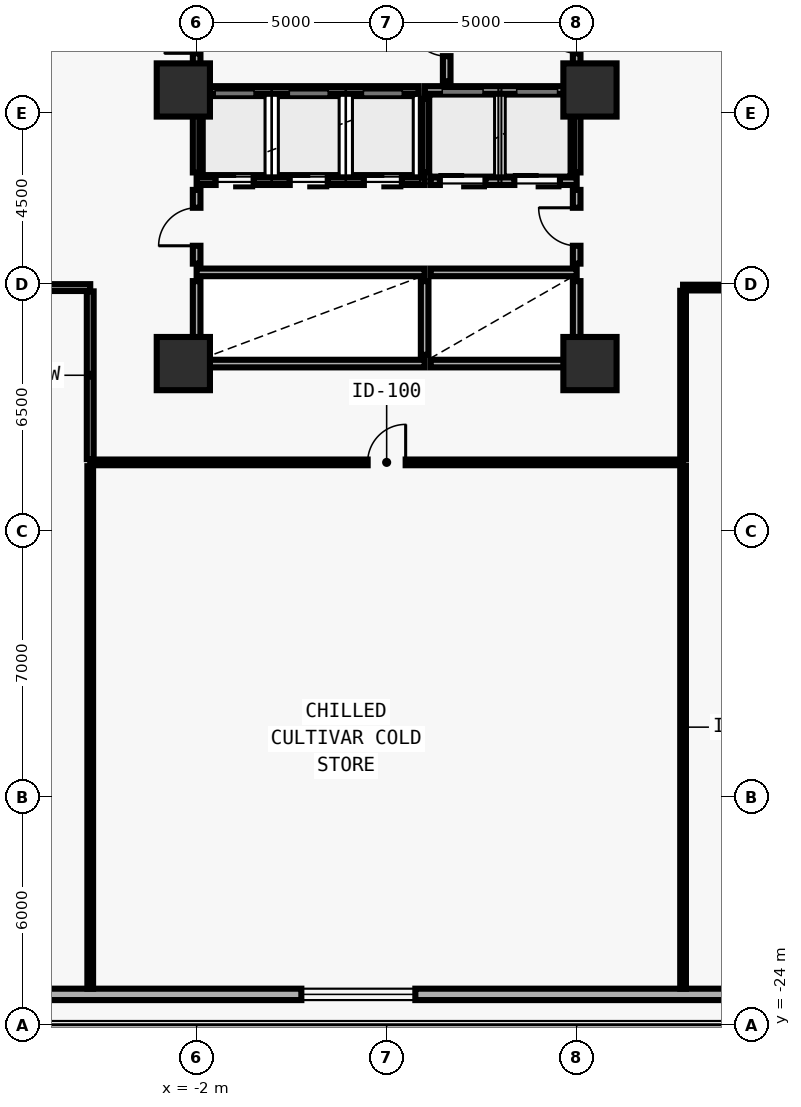
"""IFC4 building model, lengths in metres.
Left out: names, types, materials, properties, quantities, classifications, styles, units other than length and angle.
Written with IfcOpenShell. Run it as: python <this file> out.ifc"""

import sys

from ifc_helpers import new_model, si_unit, direction, frame, frame_2d, origin, origin_2d, place, context, subcontext, project, spatial, rectangle, extrude, element, fill, save


model = new_model("IFC4")
c1 = context("Model", 3, precision=1e-05, world=origin(), true_north=direction((0.0, 1.0)))
c2 = subcontext(c1, "Body", "Model", "MODEL_VIEW")
j1 = project(units=[si_unit("LENGTHUNIT", "METRE"), si_unit("PLANEANGLEUNIT", "RADIAN")], contexts=[c1])
p1 = place(None, origin())
s1 = spatial("IfcSite", under=j1, at=p1, CompositionType="ELEMENT")
p2 = place(p1, origin())
s2 = spatial("IfcBuilding", under=s1, at=p2, CompositionType="ELEMENT")
p3 = place(p2, frame((0.0, 0.0, 4.6)))
s3 = spatial("IfcBuildingStorey", under=s2, at=p3, CompositionType="ELEMENT", Elevation=4.6)
for number, where, z_axis, x_axis in (
    (1, (-2.35, 0.6, 0.0), (0.0, 0.0, 1.0), (1.0, 0.0, 0.0)),
    (2, (8.35, 0.6, 0.0), (0.0, 0.0, 1.0), (1.0, 0.0, 0.0)),
    (3, (-2.35, -6.6, 0.0), (0.0, 0.0, 1.0), (1.0, 0.0, 0.0)),
    (4, (8.35, -6.6, 0.0), (0.0, 0.0, 1.0), (1.0, 0.0, 0.0)),
):
    element("IfcColumn", number, at=place(p3, frame(where, z_axis=z_axis, x_axis=x_axis)), inside=s3, PredefinedType="COLUMN", context=c2, shape_type="SweptSolid", body=[
        extrude(rectangle(XDim=1.4, YDim=1.4, at=origin_2d()), origin(), (0.0, 0.0, 1.0), 4.575),
    ])
p4 = place(p3, frame((32.755, -23.2, 0.0), z_axis=(0.0, 0.0, 1.0), x_axis=(-1.0, 0.0, 0.0)))
e5 = element("IfcWall", 5, at=p4, inside=s3, PredefinedType="SOLIDWALL", context=c2, shape_type="SweptSolid", body=[
    extrude(rectangle(XDim=65.51, YDim=0.3, at=frame_2d((32.755, 0.0))), origin(), (0.0, 0.0, 1.0), 3.35),
])
p5 = place(p4, frame((29.0, 0.0, 0.85)))
e6 = element("IfcOpeningElement", 6, at=p5, cuts=e5, PredefinedType="OPENING", context=c2, shape_type="SweptSolid", body=[
    extrude(rectangle(XDim=3.0, YDim=2.1, at=frame_2d((1.5, 1.05))), frame((0.0, 0.16, 0.0), z_axis=(0.0, -1.0, 0.0), x_axis=(1.0, 0.0, 0.0)), (0.0, 0.0, 1.0), 0.32),
])
p6 = place(p3, frame((4.0, 0.6, 0.0), z_axis=(0.0, 0.0, 1.0), x_axis=(1.0, 0.0, 0.0)))
e7 = element("IfcWall", 7, at=p6, inside=s3, PredefinedType="SOLIDWALL", context=c2, shape_type="SweptSolid", body=[
    extrude(rectangle(XDim=3.88, YDim=0.2, at=frame_2d((1.94, 0.0))), origin(), (0.0, 0.0, 1.0), 3.362),
])
p7 = place(p3, frame((-2.0, -1.8, 0.0), z_axis=(0.0, 0.0, 1.0), x_axis=(1.0, 0.0, 0.0)))
e8 = element("IfcWall", 8, at=p7, inside=s3, PredefinedType="SOLIDWALL", context=c2, shape_type="SweptSolid", body=[
    extrude(rectangle(XDim=6.0, YDim=0.2, at=frame_2d((3.0, 0.0))), origin(), (0.0, 0.0, 1.0), 4.28),
])
p8 = place(p7, frame((0.5, 0.0, 0.0)))
e9 = element("IfcOpeningElement", 9, at=p8, cuts=e8, PredefinedType="OPENING", context=c2, shape_type="SweptSolid", body=[
    extrude(rectangle(XDim=1.0, YDim=2.2, at=frame_2d((0.5, 1.1))), frame((0.0, 0.11, 0.0), z_axis=(0.0, -1.0, 0.0), x_axis=(1.0, 0.0, 0.0)), (0.0, 0.0, 1.0), 0.22),
])
p9 = place(p7, frame((2.45, 0.0, 0.0)))
e10 = element("IfcOpeningElement", 10, at=p9, cuts=e8, PredefinedType="OPENING", context=c2, shape_type="SweptSolid", body=[
    extrude(rectangle(XDim=1.0, YDim=2.2, at=frame_2d((0.5, 1.1))), frame((0.0, 0.11, 0.0), z_axis=(0.0, -1.0, 0.0), x_axis=(1.0, 0.0, 0.0)), (0.0, 0.0, 1.0), 0.22),
])
p10 = place(p7, frame((4.4, 0.0, 0.0)))
e11 = element("IfcOpeningElement", 11, at=p10, cuts=e8, PredefinedType="OPENING", context=c2, shape_type="SweptSolid", body=[
    extrude(rectangle(XDim=1.0, YDim=2.2, at=frame_2d((0.5, 1.1))), frame((0.0, 0.11, 0.0), z_axis=(0.0, -1.0, 0.0), x_axis=(1.0, 0.0, 0.0)), (0.0, 0.0, 1.0), 0.22),
])
p11 = place(p3, frame((-2.0, -1.57, 0.0), z_axis=(0.0, 0.0, 1.0), x_axis=(0.0, 1.0, 0.0)))
e12 = element("IfcWall", 12, at=p11, inside=s3, PredefinedType="SOLIDWALL", context=c2, shape_type="SweptSolid", body=[
    extrude(rectangle(XDim=2.05, YDim=0.2, at=frame_2d((1.025, 0.0))), origin(), (0.0, 0.0, 1.0), 3.362),
])
p12 = place(p3, frame((4.16, -1.8, 0.0), z_axis=(0.0, 0.0, 1.0), x_axis=(1.0, 0.0, 0.0)))
e13 = element("IfcWall", 13, at=p12, inside=s3, PredefinedType="SOLIDWALL", context=c2, shape_type="SweptSolid", body=[
    extrude(rectangle(XDim=3.84, YDim=0.2, at=frame_2d((1.92, 0.0))), origin(), (0.0, 0.0, 1.0), 4.28),
])
p13 = place(p12, frame((0.24, 0.0, 0.0)))
e14 = element("IfcOpeningElement", 14, at=p13, cuts=e13, PredefinedType="OPENING", context=c2, shape_type="SweptSolid", body=[
    extrude(rectangle(XDim=1.2, YDim=2.25, at=frame_2d((0.6, 1.125))), frame((0.0, 0.11, 0.0), z_axis=(0.0, -1.0, 0.0), x_axis=(1.0, 0.0, 0.0)), (0.0, 0.0, 1.0), 0.22),
])
p14 = place(p12, frame((2.2, 0.0, 0.0)))
e15 = element("IfcOpeningElement", 15, at=p14, cuts=e13, PredefinedType="OPENING", context=c2, shape_type="SweptSolid", body=[
    extrude(rectangle(XDim=1.2, YDim=2.25, at=frame_2d((0.6, 1.125))), frame((0.0, 0.11, 0.0), z_axis=(0.0, -1.0, 0.0), x_axis=(1.0, 0.0, 0.0)), (0.0, 0.0, 1.0), 0.22),
])
p15 = place(p3, frame((4.0, -1.57, 0.0), z_axis=(0.0, 0.0, 1.0), x_axis=(0.0, 1.0, 0.0)))
e16 = element("IfcWall", 16, at=p15, inside=s3, PredefinedType="SOLIDWALL", context=c2, shape_type="SweptSolid", body=[
    extrude(rectangle(XDim=1.94, YDim=0.2, at=frame_2d((0.97, 0.0))), origin(), (0.0, 0.0, 1.0), 4.28),
])
p16 = place(p3, frame((8.0, -1.57, 0.0), z_axis=(0.0, 0.0, 1.0), x_axis=(0.0, 1.0, 0.0)))
e17 = element("IfcWall", 17, at=p16, inside=s3, PredefinedType="SOLIDWALL", context=c2, shape_type="SweptSolid", body=[
    extrude(rectangle(XDim=2.05, YDim=0.2, at=frame_2d((1.025, 0.0))), origin(), (0.0, 0.0, 1.0), 3.362),
])
p17 = place(p3, frame((-2.0, -4.2, 0.0), z_axis=(0.0, 0.0, 1.0), x_axis=(1.0, 0.0, 0.0)))
e18 = element("IfcWall", 18, at=p17, inside=s3, PredefinedType="SOLIDWALL", context=c2, shape_type="SweptSolid", body=[
    extrude(rectangle(XDim=6.0, YDim=0.2, at=frame_2d((3.0, 0.0))), origin(), (0.0, 0.0, 1.0), 4.28),
])
p18 = place(p3, frame((-2.0, -6.6, 0.0), z_axis=(0.0, 0.0, 1.0), x_axis=(1.0, 0.0, 0.0)))
e19 = element("IfcWall", 19, at=p18, inside=s3, PredefinedType="SOLIDWALL", context=c2, shape_type="SweptSolid", body=[
    extrude(rectangle(XDim=6.0, YDim=0.2, at=frame_2d((3.0, 0.0))), origin(), (0.0, 0.0, 1.0), 3.362),
])
p19 = place(p3, frame((-2.0, -6.37, 0.0), z_axis=(0.0, 0.0, 1.0), x_axis=(0.0, 1.0, 0.0)))
e20 = element("IfcWall", 20, at=p19, inside=s3, PredefinedType="SOLIDWALL", context=c2, shape_type="SweptSolid", body=[
    extrude(rectangle(XDim=1.94, YDim=0.2, at=frame_2d((0.97, 0.0))), origin(), (0.0, 0.0, 1.0), 3.362),
])
p20 = place(p3, frame((4.16, -4.2, 0.0), z_axis=(0.0, 0.0, 1.0), x_axis=(1.0, 0.0, 0.0)))
e21 = element("IfcWall", 21, at=p20, inside=s3, PredefinedType="SOLIDWALL", context=c2, shape_type="SweptSolid", body=[
    extrude(rectangle(XDim=3.84, YDim=0.2, at=frame_2d((1.92, 0.0))), origin(), (0.0, 0.0, 1.0), 4.28),
])
p21 = place(p3, frame((4.16, -6.6, 0.0), z_axis=(0.0, 0.0, 1.0), x_axis=(1.0, 0.0, 0.0)))
e22 = element("IfcWall", 22, at=p21, inside=s3, PredefinedType="SOLIDWALL", context=c2, shape_type="SweptSolid", body=[
    extrude(rectangle(XDim=3.84, YDim=0.2, at=frame_2d((1.92, 0.0))), origin(), (0.0, 0.0, 1.0), 3.362),
])
p22 = place(p3, frame((4.0, -6.37, 0.0), z_axis=(0.0, 0.0, 1.0), x_axis=(0.0, 1.0, 0.0)))
e23 = element("IfcWall", 23, at=p22, inside=s3, PredefinedType="SOLIDWALL", context=c2, shape_type="SweptSolid", body=[
    extrude(rectangle(XDim=1.94, YDim=0.2, at=frame_2d((0.97, 0.0))), origin(), (0.0, 0.0, 1.0), 4.28),
])
p23 = place(p3, frame((8.0, -6.37, 0.0), z_axis=(0.0, 0.0, 1.0), x_axis=(0.0, 1.0, 0.0)))
e24 = element("IfcWall", 24, at=p23, inside=s3, PredefinedType="SOLIDWALL", context=c2, shape_type="SweptSolid", body=[
    extrude(rectangle(XDim=1.94, YDim=0.2, at=frame_2d((0.97, 0.0))), origin(), (0.0, 0.0, 1.0), 3.362),
])
p24 = place(p3, frame((4.58, 0.83, 0.0), z_axis=(0.0, 0.0, 1.0), x_axis=(0.0, 1.0, 0.0)))
e25 = element("IfcWall", 25, at=p24, inside=s3, PredefinedType="MOVABLE", context=c2, shape_type="SweptSolid", body=[
    extrude(rectangle(XDim=2.14, YDim=0.2, at=frame_2d((1.07, 0.0))), origin(), (0.0, 0.0, 1.0), 4.28),
])
p25 = place(p24, frame((0.66, 0.0, 0.0)))
e26 = element("IfcOpeningElement", 26, at=p25, cuts=e25, PredefinedType="OPENING", context=c2, shape_type="SweptSolid", body=[
    extrude(rectangle(XDim=1.0, YDim=2.1, at=frame_2d((0.5, 1.05))), frame((0.0, 0.11, 0.0), z_axis=(0.0, -1.0, 0.0), x_axis=(1.0, 0.0, 0.0)), (0.0, 0.0, 1.0), 0.22),
])
p26 = place(p3, frame((-2.0, 0.72, 0.0), z_axis=(0.0, 0.0, 1.0), x_axis=(0.0, 1.0, 0.0)))
e27 = element("IfcWall", 27, at=p26, inside=s3, PredefinedType="MOVABLE", context=c2, shape_type="SweptSolid", body=[
    extrude(rectangle(XDim=2.25, YDim=0.2, at=frame_2d((1.125, 0.0))), origin(), (0.0, 0.0, 1.0), 3.512),
])
p27 = place(p26, frame((0.845, 0.0, 0.0)))
e28 = element("IfcOpeningElement", 28, at=p27, cuts=e27, PredefinedType="OPENING", context=c2, shape_type="SweptSolid", body=[
    extrude(rectangle(XDim=0.85, YDim=2.1, at=frame_2d((0.425, 1.05))), frame((0.0, 0.11, 0.0), z_axis=(0.0, -1.0, 0.0), x_axis=(1.0, 0.0, 0.0)), (0.0, 0.0, 1.0), 0.22),
])
p28 = place(p3, frame((8.0, 0.72, 0.0), z_axis=(0.0, 0.0, 1.0), x_axis=(0.0, 1.0, 0.0)))
e29 = element("IfcWall", 29, at=p28, inside=s3, PredefinedType="MOVABLE", context=c2, shape_type="SweptSolid", body=[
    extrude(rectangle(XDim=2.25, YDim=0.2, at=frame_2d((1.125, 0.0))), origin(), (0.0, 0.0, 1.0), 3.512),
])
p29 = place(p28, frame((0.845, 0.0, 0.0)))
e30 = element("IfcOpeningElement", 30, at=p29, cuts=e29, PredefinedType="OPENING", context=c2, shape_type="SweptSolid", body=[
    extrude(rectangle(XDim=0.85, YDim=2.1, at=frame_2d((0.425, 1.05))), frame((0.0, 0.11, 0.0), z_axis=(0.0, -1.0, 0.0), x_axis=(1.0, 0.0, 0.0)), (0.0, 0.0, 1.0), 0.22),
])
p30 = place(p3, frame((-2.0, -3.97, 0.0), z_axis=(0.0, 0.0, 1.0), x_axis=(0.0, 1.0, 0.0)))
e31 = element("IfcWall", 31, at=p30, inside=s3, PredefinedType="MOVABLE", context=c2, shape_type="SweptSolid", body=[
    extrude(rectangle(XDim=1.94, YDim=0.2, at=frame_2d((0.97, 0.0))), origin(), (0.0, 0.0, 1.0), 3.362),
])
p31 = place(p30, frame((0.47, 0.0, 0.0)))
e32 = element("IfcOpeningElement", 32, at=p31, cuts=e31, PredefinedType="OPENING", context=c2, shape_type="SweptSolid", body=[
    extrude(rectangle(XDim=1.0, YDim=2.1, at=frame_2d((0.5, 1.05))), frame((0.0, 0.11, 0.0), z_axis=(0.0, -1.0, 0.0), x_axis=(1.0, 0.0, 0.0)), (0.0, 0.0, 1.0), 0.22),
])
p32 = place(p3, frame((8.0, -3.97, 0.0), z_axis=(0.0, 0.0, 1.0), x_axis=(0.0, 1.0, 0.0)))
e33 = element("IfcWall", 33, at=p32, inside=s3, PredefinedType="MOVABLE", context=c2, shape_type="SweptSolid", body=[
    extrude(rectangle(XDim=1.94, YDim=0.2, at=frame_2d((0.97, 0.0))), origin(), (0.0, 0.0, 1.0), 3.362),
])
p33 = place(p32, frame((0.47, 0.0, 0.0)))
e34 = element("IfcOpeningElement", 34, at=p33, cuts=e33, PredefinedType="OPENING", context=c2, shape_type="SweptSolid", body=[
    extrude(rectangle(XDim=1.0, YDim=2.1, at=frame_2d((0.5, 1.05))), frame((0.0, 0.11, 0.0), z_axis=(0.0, -1.0, 0.0), x_axis=(1.0, 0.0, 0.0)), (0.0, 0.0, 1.0), 0.22),
])
p34 = place(p3, frame((-33.05, -4.6, 0.0), z_axis=(0.0, 0.0, 1.0), x_axis=(1.0, 0.0, 0.0)))
e35 = element("IfcWall", 35, at=p34, inside=s3, PredefinedType="PLUMBINGWALL", context=c2, shape_type="SweptSolid", body=[
    extrude(rectangle(XDim=28.25, YDim=0.18, at=frame_2d((14.125, 0.0))), origin(), (0.0, 0.0, 1.0), 4.28),
])
p35 = place(p34, frame((13.625, 0.0, 0.0)))
e36 = element("IfcOpeningElement", 36, at=p35, cuts=e35, PredefinedType="OPENING", context=c2, shape_type="SweptSolid", body=[
    extrude(rectangle(XDim=1.0, YDim=2.1, at=frame_2d((0.5, 1.05))), frame((0.0, 0.1, 0.0), z_axis=(0.0, -1.0, 0.0), x_axis=(1.0, 0.0, 0.0)), (0.0, 0.0, 1.0), 0.2),
])
p36 = place(p3, frame((10.8, -4.6, 0.0), z_axis=(0.0, 0.0, 1.0), x_axis=(1.0, 0.0, 0.0)))
e37 = element("IfcWall", 37, at=p36, inside=s3, PredefinedType="PARTITIONING", context=c2, shape_type="SweptSolid", body=[
    extrude(rectangle(XDim=16.4, YDim=0.15, at=frame_2d((8.2, 0.0))), origin(), (0.0, 0.0, 1.0), 4.28),
])
p37 = place(p36, frame((7.7, 0.0, 0.0)))
e38 = element("IfcOpeningElement", 38, at=p37, cuts=e37, PredefinedType="OPENING", context=c2, shape_type="SweptSolid", body=[
    extrude(rectangle(XDim=1.0, YDim=2.1, at=frame_2d((0.5, 1.05))), frame((0.0, 0.085, 0.0), z_axis=(0.0, -1.0, 0.0), x_axis=(1.0, 0.0, 0.0)), (0.0, 0.0, 1.0), 0.17),
])
p38 = place(p3, frame((-4.8, -9.2, 0.0), z_axis=(0.0, 0.0, 1.0), x_axis=(1.0, 0.0, 0.0)))
e39 = element("IfcWall", 39, at=p38, inside=s3, PredefinedType="PARTITIONING", context=c2, shape_type="SweptSolid", body=[
    extrude(rectangle(XDim=15.6, YDim=0.15, at=frame_2d((7.8, 0.0))), origin(), (0.0, 0.0, 1.0), 4.28),
])
p39 = place(p38, frame((7.3, 0.0, 0.0)))
e40 = element("IfcOpeningElement", 40, at=p39, cuts=e39, PredefinedType="OPENING", context=c2, shape_type="SweptSolid", body=[
    extrude(rectangle(XDim=1.0, YDim=2.1, at=frame_2d((0.5, 1.05))), frame((0.0, 0.085, 0.0), z_axis=(0.0, -1.0, 0.0), x_axis=(1.0, 0.0, 0.0)), (0.0, 0.0, 1.0), 0.17),
])
p40 = place(p3, frame((-1.88, 0.6, 0.0), z_axis=(0.0, 0.0, 1.0), x_axis=(1.0, 0.0, 0.0)))
e41 = element("IfcWall", 41, at=p40, inside=s3, PredefinedType="MOVABLE", context=c2, shape_type="SweptSolid", body=[
    extrude(rectangle(XDim=5.72, YDim=0.2, at=frame_2d((2.86, 0.0))), origin(), (0.0, 0.0, 1.0), 3.362),
])
p41 = place(p3, frame((-4.8, -4.7, 0.0), z_axis=(0.0, 0.0, 1.0), x_axis=(0.0, -1.0, 0.0)))
e42 = element("IfcWall", 42, at=p41, inside=s3, PredefinedType="PLUMBINGWALL", context=c2, shape_type="SweptSolid", body=[
    extrude(rectangle(XDim=4.415, YDim=0.18, at=frame_2d((2.208, 0.0))), origin(), (0.0, 0.0, 1.0), 4.28),
])
p42 = place(p3, frame((10.8, -9.115, 0.0), z_axis=(0.0, 0.0, 1.0), x_axis=(0.0, 1.0, 0.0)))
e43 = element("IfcWall", 43, at=p42, inside=s3, PredefinedType="PARTITIONING", context=c2, shape_type="SweptSolid", body=[
    extrude(rectangle(XDim=4.43, YDim=0.15, at=frame_2d((2.215, 0.0))), origin(), (0.0, 0.0, 1.0), 4.28),
])
p43 = place(p3, frame((-4.8, -9.3, 0.0), z_axis=(0.0, 0.0, 1.0), x_axis=(0.0, -1.0, 0.0)))
e44 = element("IfcWall", 44, at=p43, inside=s3, PredefinedType="PARTITIONING", context=c2, shape_type="SweptSolid", body=[
    extrude(rectangle(XDim=13.75, YDim=0.15, at=frame_2d((6.875, 0.0))), origin(), (0.0, 0.0, 1.0), 4.28),
])
p44 = place(p3, frame((10.8, -23.05, 0.0), z_axis=(0.0, 0.0, 1.0), x_axis=(0.0, 1.0, 0.0)))
e45 = element("IfcWall", 45, at=p44, inside=s3, PredefinedType="PARTITIONING", context=c2, shape_type="SweptSolid", body=[
    extrude(rectangle(XDim=13.765, YDim=0.15, at=frame_2d((6.883, 0.0))), origin(), (0.0, 0.0, 1.0), 4.28),
])
p45 = place(p5, origin())
e46 = element("IfcWindow", 46, at=p45, inside=s3, PartitioningType="SINGLE_PANEL", PredefinedType="WINDOW", context=c2, shape_type="SweptSolid", body=[
    extrude(rectangle(XDim=3.0, YDim=2.1, at=frame_2d((1.5, 1.05))), frame((0.0, 0.03, 0.0), z_axis=(0.0, -1.0, 0.0), x_axis=(1.0, 0.0, 0.0)), (0.0, 0.0, 1.0), 0.06),
])
fill(e6, e46)
p46 = place(p25, origin())
e47 = element("IfcDoor", 47, at=p46, inside=s3, OperationType="SINGLE_SWING_RIGHT", PredefinedType="DOOR", context=c2, shape_type="SweptSolid", body=[
    extrude(rectangle(XDim=1.0, YDim=2.1, at=frame_2d((0.5, 1.05))), frame((0.0, 0.025, 0.0), z_axis=(0.0, -1.0, 0.0), x_axis=(1.0, 0.0, 0.0)), (0.0, 0.0, 1.0), 0.05),
])
fill(e26, e47)
p47 = place(p27, origin())
e48 = element("IfcDoor", 48, at=p47, inside=s3, OperationType="SINGLE_SWING_LEFT", PredefinedType="DOOR", context=c2, shape_type="SweptSolid", body=[
    extrude(rectangle(XDim=0.85, YDim=2.1, at=frame_2d((0.425, 1.05))), frame((0.0, 0.025, 0.0), z_axis=(0.0, -1.0, 0.0), x_axis=(1.0, 0.0, 0.0)), (0.0, 0.0, 1.0), 0.05),
])
fill(e28, e48)
p48 = place(p29, origin())
e49 = element("IfcDoor", 49, at=p48, inside=s3, OperationType="SINGLE_SWING_RIGHT", PredefinedType="DOOR", context=c2, shape_type="SweptSolid", body=[
    extrude(rectangle(XDim=0.85, YDim=2.1, at=frame_2d((0.425, 1.05))), frame((0.0, 0.025, 0.0), z_axis=(0.0, -1.0, 0.0), x_axis=(1.0, 0.0, 0.0)), (0.0, 0.0, 1.0), 0.05),
])
fill(e30, e49)
p49 = place(p31, origin())
e50 = element("IfcDoor", 50, at=p49, inside=s3, OperationType="SINGLE_SWING_LEFT", PredefinedType="DOOR", context=c2, shape_type="SweptSolid", body=[
    extrude(rectangle(XDim=1.0, YDim=2.1, at=frame_2d((0.5, 1.05))), frame((0.0, 0.025, 0.0), z_axis=(0.0, -1.0, 0.0), x_axis=(1.0, 0.0, 0.0)), (0.0, 0.0, 1.0), 0.05),
])
fill(e32, e50)
p50 = place(p33, origin())
e51 = element("IfcDoor", 51, at=p50, inside=s3, OperationType="SINGLE_SWING_RIGHT", PredefinedType="DOOR", context=c2, shape_type="SweptSolid", body=[
    extrude(rectangle(XDim=1.0, YDim=2.1, at=frame_2d((0.5, 1.05))), frame((0.0, 0.025, 0.0), z_axis=(0.0, -1.0, 0.0), x_axis=(1.0, 0.0, 0.0)), (0.0, 0.0, 1.0), 0.05),
])
fill(e34, e51)
p51 = place(p39, origin())
e52 = element("IfcDoor", 52, at=p51, inside=s3, OperationType="SINGLE_SWING_RIGHT", PredefinedType="DOOR", context=c2, shape_type="SweptSolid", body=[
    extrude(rectangle(XDim=1.0, YDim=2.1, at=frame_2d((0.5, 1.05))), frame((0.0, 0.025, 0.0), z_axis=(0.0, -1.0, 0.0), x_axis=(1.0, 0.0, 0.0)), (0.0, 0.0, 1.0), 0.05),
])
fill(e40, e52)
p52 = place(p8, origin())
e53 = element("IfcDoor", 53, at=p52, inside=s3, OperationType="DOUBLE_DOOR_SLIDING", PredefinedType="DOOR", context=c2, shape_type="SweptSolid", body=[
    extrude(rectangle(XDim=1.0, YDim=2.2, at=frame_2d((0.5, 1.1))), frame((0.0, 0.025, 0.0), z_axis=(0.0, -1.0, 0.0), x_axis=(1.0, 0.0, 0.0)), (0.0, 0.0, 1.0), 0.05),
])
fill(e9, e53)
p53 = place(p9, origin())
e54 = element("IfcDoor", 54, at=p53, inside=s3, OperationType="DOUBLE_DOOR_SLIDING", PredefinedType="DOOR", context=c2, shape_type="SweptSolid", body=[
    extrude(rectangle(XDim=1.0, YDim=2.2, at=frame_2d((0.5, 1.1))), frame((0.0, 0.025, 0.0), z_axis=(0.0, -1.0, 0.0), x_axis=(1.0, 0.0, 0.0)), (0.0, 0.0, 1.0), 0.05),
])
fill(e10, e54)
p54 = place(p10, origin())
e55 = element("IfcDoor", 55, at=p54, inside=s3, OperationType="DOUBLE_DOOR_SLIDING", PredefinedType="DOOR", context=c2, shape_type="SweptSolid", body=[
    extrude(rectangle(XDim=1.0, YDim=2.2, at=frame_2d((0.5, 1.1))), frame((0.0, 0.025, 0.0), z_axis=(0.0, -1.0, 0.0), x_axis=(1.0, 0.0, 0.0)), (0.0, 0.0, 1.0), 0.05),
])
fill(e11, e55)
p55 = place(p13, origin())
e56 = element("IfcDoor", 56, at=p55, inside=s3, OperationType="DOUBLE_DOOR_SLIDING", PredefinedType="DOOR", context=c2, shape_type="SweptSolid", body=[
    extrude(rectangle(XDim=1.2, YDim=2.25, at=frame_2d((0.6, 1.125))), frame((0.0, 0.025, 0.0), z_axis=(0.0, -1.0, 0.0), x_axis=(1.0, 0.0, 0.0)), (0.0, 0.0, 1.0), 0.05),
])
fill(e14, e56)
p56 = place(p14, origin())
e57 = element("IfcDoor", 57, at=p56, inside=s3, OperationType="DOUBLE_DOOR_SLIDING", PredefinedType="DOOR", context=c2, shape_type="SweptSolid", body=[
    extrude(rectangle(XDim=1.2, YDim=2.25, at=frame_2d((0.6, 1.125))), frame((0.0, 0.025, 0.0), z_axis=(0.0, -1.0, 0.0), x_axis=(1.0, 0.0, 0.0)), (0.0, 0.0, 1.0), 0.05),
])
fill(e15, e57)
save(model, sys.argv[1])
